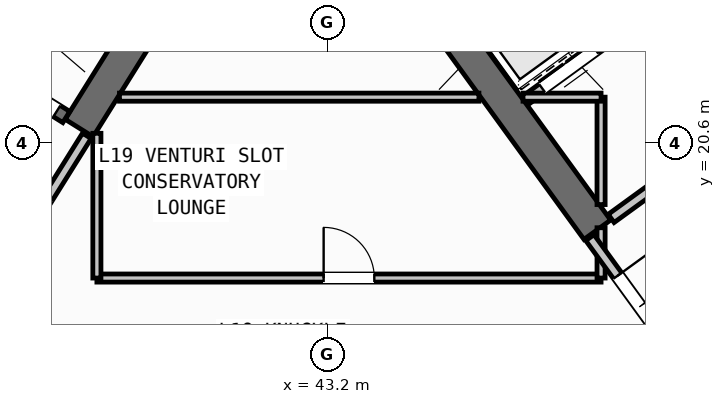
"""IFC4 building model, lengths in metres.
Left out: names, types, materials, properties, quantities, classifications, styles, units other than length and angle.
Written with IfcOpenShell. Run it as: python <this file> out.ifc"""

import sys

from ifc_helpers import new_model, si_unit, direction, frame, frame_2d, origin, place, context, subcontext, project, spatial, rectangle, extrude, source, transform, mapped, element, fill, save


model = new_model("IFC4")
c1 = context("Model", 3, precision=1e-05, world=origin(), true_north=direction((0.0, 1.0)))
c2 = subcontext(c1, "Body", "Model", "MODEL_VIEW")
j1 = project(units=[si_unit("LENGTHUNIT", "METRE"), si_unit("PLANEANGLEUNIT", "RADIAN")], contexts=[c1])
p1 = place(None, origin())
s1 = spatial("IfcSite", under=j1, at=p1, CompositionType="ELEMENT")
p2 = place(p1, origin())
s2 = spatial("IfcBuilding", under=s1, at=p2, CompositionType="ELEMENT")
p3 = place(p2, frame((0.0, 0.0, 76.5)))
s3 = spatial("IfcBuildingStorey", under=s2, at=p3, CompositionType="ELEMENT", Elevation=76.5)
p4 = place(p3, frame((40.168, 23.88, 0.0), z_axis=(0.0, 0.0, 1.0), x_axis=(-0.529893103397, -0.8480644427, 0.0)))
e1 = element("IfcWall", 1, at=p4, inside=s3, PredefinedType="SHEAR", context=c2, shape_type="SweptSolid", body=[
    extrude(rectangle(XDim=3.525, YDim=0.65, at=frame_2d((1.763, 0.0))), origin(), (0.0, 0.0, 1.0), 4.25),
])
p5 = place(p3, frame((48.526, 18.884, 0.0), z_axis=(0.0, 0.0, 1.0), x_axis=(-0.58777996584, 0.809020835181, 0.0)))
e2 = element("IfcWall", 2, at=p5, inside=s3, PredefinedType="SHEAR", context=c2, shape_type="SweptSolid", body=[
    extrude(rectangle(XDim=6.375, YDim=0.65, at=frame_2d((3.188, 0.0))), origin(), (0.0, 0.0, 1.0), 4.25),
])
p6 = place(p3, frame((38.046, 21.108, 0.0), z_axis=(0.0, 0.0, 1.0), x_axis=(-0.848054434086, 0.529909121291, 0.0)))
e3 = element("IfcWall", 3, at=p6, inside=s3, PredefinedType="SHEAR", context=c2, shape_type="SweptSolid", body=[
    extrude(rectangle(XDim=7.33, YDim=0.26, at=frame_2d((3.665, 0.0))), origin(), (0.0, 0.0, 1.0), 4.25),
])
p7 = place(p6, frame((0.22, 0.0, 0.0)))
e4 = element("IfcOpeningElement", 4, at=p7, cuts=e3, PredefinedType="OPENING", context=c2, shape_type="SweptSolid", body=[
    extrude(rectangle(XDim=1.1, YDim=2.1, at=frame_2d((0.55, 1.05))), frame((0.0, 0.14, 0.0), z_axis=(0.0, -1.0, 0.0), x_axis=(1.0, 0.0, 0.0)), (0.0, 0.0, 1.0), 0.28),
])
p8 = place(p3, frame((47.106, 21.437, 0.0), z_axis=(0.0, 0.0, 1.0), x_axis=(0.809012514015, 0.58779141893, 0.0)))
e5 = element("IfcWall", 5, at=p8, inside=s3, PredefinedType="STANDARD", context=c2, shape_type="SweptSolid", body=[
    extrude(rectangle(XDim=3.398, YDim=0.2, at=frame_2d((1.699, 0.0))), origin(), (0.0, 0.0, 1.0), 4.24),
])
p9 = place(p8, frame((0.408, 0.0, 0.0)))
e6 = element("IfcOpeningElement", 6, at=p9, cuts=e5, PredefinedType="OPENING", context=c2, shape_type="SweptSolid", body=[
    extrude(rectangle(XDim=1.3, YDim=2.2, at=frame_2d((0.65, 1.1))), frame((0.0, 0.11, 0.0), z_axis=(0.0, -1.0, 0.0), x_axis=(1.0, 0.0, 0.0)), (0.0, 0.0, 1.0), 0.22),
])
p10 = place(p3, frame((48.799, 19.107, 0.0), z_axis=(0.0, 0.0, 1.0), x_axis=(0.809012959416, 0.587790805897, 0.0)))
e7 = element("IfcWall", 7, at=p10, inside=s3, PredefinedType="STANDARD", context=c2, shape_type="SweptSolid", body=[
    extrude(rectangle(XDim=5.718, YDim=0.2, at=frame_2d((2.859, 0.0))), origin(), (0.0, 0.0, 1.0), 4.24),
])
p11 = place(p10, frame((2.498, 0.0, 0.0)))
e8 = element("IfcOpeningElement", 8, at=p11, cuts=e7, PredefinedType="OPENING", context=c2, shape_type="SweptSolid", body=[
    extrude(rectangle(XDim=1.15, YDim=2.1, at=frame_2d((0.575, 1.05))), frame((0.0, 0.11, 0.0), z_axis=(0.0, -1.0, 0.0), x_axis=(1.0, 0.0, 0.0)), (0.0, 0.0, 1.0), 0.22),
])
p12 = place(p3, frame((38.451, 20.737, 0.0), z_axis=(0.0, 0.0, 1.0), x_axis=(-0.529924799939, -0.848044637038, 0.0)))
e9 = element("IfcWall", 9, at=p12, inside=s3, PredefinedType="STANDARD", context=c2, shape_type="SweptSolid", body=[
    extrude(rectangle(XDim=2.96, YDim=0.2, at=frame_2d((1.48, 0.0))), origin(), (0.0, 0.0, 1.0), 4.24),
])
p13 = place(p12, frame((1.46, 0.0, 0.0)))
e10 = element("IfcOpeningElement", 10, at=p13, cuts=e9, PredefinedType="OPENING", context=c2, shape_type="SweptSolid", body=[
    extrude(rectangle(XDim=0.86, YDim=2.05, at=frame_2d((0.43, 1.025))), frame((0.0, 0.11, 0.0), z_axis=(0.0, -1.0, 0.0), x_axis=(1.0, 0.0, 0.0)), (0.0, 0.0, 1.0), 0.22),
])
p14 = place(p3, frame((38.65, 17.93, 0.0), z_axis=(0.0, 0.0, 1.0), x_axis=(1.0, 0.0, 0.0)))
e11 = element("IfcWall", 11, at=p14, inside=s3, PredefinedType="PARTITIONING", context=c2, shape_type="SweptSolid", body=[
    extrude(rectangle(XDim=9.95, YDim=0.16, at=frame_2d((4.975, 0.0))), origin(), (0.0, 0.0, 1.0), 4.24),
])
p15 = place(p14, frame((4.475, 0.0, 0.0)))
e12 = element("IfcOpeningElement", 12, at=p15, cuts=e11, PredefinedType="OPENING", context=c2, shape_type="SweptSolid", body=[
    extrude(rectangle(XDim=1.0, YDim=2.1, at=frame_2d((0.5, 1.05))), frame((0.0, 0.09, 0.0), z_axis=(0.0, -1.0, 0.0), x_axis=(1.0, 0.0, 0.0)), (0.0, 0.0, 1.0), 0.18),
])
p16 = place(p3, frame((38.65, 17.93, 0.0), z_axis=(0.0, 0.0, 1.0), x_axis=(0.0, 1.0, 0.0)))
e13 = element("IfcWall", 13, at=p16, inside=s3, PredefinedType="PARTITIONING", context=c2, shape_type="SweptSolid", body=[
    extrude(rectangle(XDim=2.857, YDim=0.16, at=frame_2d((1.428, 0.0))), origin(), (0.0, 0.0, 1.0), 4.24),
])
p17 = place(p3, frame((48.6, 17.93, 0.0), z_axis=(0.0, 0.0, 1.0), x_axis=(0.0, 1.0, 0.0)))
e14 = element("IfcWall", 14, at=p17, inside=s3, PredefinedType="PARTITIONING", context=c2, shape_type="SweptSolid", body=[
    extrude(rectangle(XDim=0.993, YDim=0.16, at=frame_2d((0.496, 0.0))), origin(), (0.0, 0.0, 1.0), 4.24),
])
p18 = place(p3, frame((48.6, 19.38, 0.0), z_axis=(0.0, 0.0, 1.0), x_axis=(0.0, 1.0, 0.0)))
e15 = element("IfcWall", 15, at=p18, inside=s3, PredefinedType="PARTITIONING", context=c2, shape_type="SweptSolid", body=[
    extrude(rectangle(XDim=2.12, YDim=0.16, at=frame_2d((1.06, 0.0))), origin(), (0.0, 0.0, 1.0), 4.24),
])
p19 = place(p3, frame((39.095, 21.5, 0.0), z_axis=(0.0, 0.0, 1.0), x_axis=(1.0, 0.0, 0.0)))
e16 = element("IfcWall", 16, at=p19, inside=s3, PredefinedType="PARTITIONING", context=c2, shape_type="SweptSolid", body=[
    extrude(rectangle(XDim=7.094, YDim=0.16, at=frame_2d((3.547, 0.0))), origin(), (0.0, 0.0, 1.0), 4.24),
])
p20 = place(p3, frame((47.06, 21.5, 0.0), z_axis=(0.0, 0.0, 1.0), x_axis=(1.0, 0.0, 0.0)))
e17 = element("IfcWall", 17, at=p20, inside=s3, PredefinedType="PARTITIONING", context=c2, shape_type="SweptSolid", body=[
    extrude(rectangle(XDim=1.54, YDim=0.16, at=frame_2d((0.77, 0.0))), origin(), (0.0, 0.0, 1.0), 4.24),
])
p21 = place(p3, frame((50.119, 16.333, 0.0), z_axis=(0.0, 0.0, 1.0), x_axis=(-0.587749856981, 0.809042709391, 0.0)))
e18 = element("IfcWall", 18, at=p21, inside=s3, PredefinedType="STANDARD", context=c2, shape_type="SweptSolid", body=[
    extrude(rectangle(XDim=2.96, YDim=0.2, at=frame_2d((1.48, 0.0))), origin(), (0.0, 0.0, 1.0), 4.24),
])
p22 = place(p21, frame((0.53, 0.0, 0.0)))
e19 = element("IfcOpeningElement", 19, at=p22, cuts=e18, PredefinedType="OPENING", context=c2, shape_type="SweptSolid", body=[
    extrude(rectangle(XDim=1.5, YDim=2.15, at=frame_2d((0.75, 1.075))), frame((0.0, 0.11, 0.0), z_axis=(0.0, -1.0, 0.0), x_axis=(1.0, 0.0, 0.0)), (0.0, 0.0, 1.0), 0.22),
])
m1 = source(origin(), c2, "Body", "SweptSolid", [
    extrude(rectangle(XDim=1.1, YDim=2.1, at=frame_2d((0.55, 1.05))), frame((0.0, 0.025, 0.0), z_axis=(0.0, -1.0, 0.0), x_axis=(1.0, 0.0, 0.0)), (0.0, 0.0, 1.0), 0.05),
])
p23 = place(p7, origin())
e20 = element("IfcDoor", 20, at=p23, inside=s3, OperationType="SINGLE_SWING_RIGHT", PredefinedType="DOOR", context=c2, shape_type="MappedRepresentation", body=[
    mapped(m1, transform((0.0, 0.0, 0.0), scale=1.0)),
])
fill(e4, e20)
m2 = source(origin(), c2, "Body", "SweptSolid", [
    extrude(rectangle(XDim=1.3, YDim=2.2, at=frame_2d((0.65, 1.1))), frame((0.0, 0.025, 0.0), z_axis=(0.0, -1.0, 0.0), x_axis=(1.0, 0.0, 0.0)), (0.0, 0.0, 1.0), 0.05),
])
p24 = place(p9, origin())
e21 = element("IfcDoor", 21, at=p24, inside=s3, OperationType="DOUBLE_DOOR_SLIDING", PredefinedType="DOOR", context=c2, shape_type="MappedRepresentation", body=[
    mapped(m2, transform((0.0, 0.0, 0.0), scale=1.0)),
])
fill(e6, e21)
m3 = source(origin(), c2, "Body", "SweptSolid", [
    extrude(rectangle(XDim=1.0, YDim=2.1, at=frame_2d((0.5, 1.05))), frame((0.0, 0.025, 0.0), z_axis=(0.0, -1.0, 0.0), x_axis=(1.0, 0.0, 0.0)), (0.0, 0.0, 1.0), 0.05),
])
p25 = place(p15, origin())
e22 = element("IfcDoor", 22, at=p25, inside=s3, OperationType="SINGLE_SWING_LEFT", PredefinedType="DOOR", context=c2, shape_type="MappedRepresentation", body=[
    mapped(m3, transform((0.0, 0.0, 0.0), scale=1.0)),
])
fill(e12, e22)
m4 = source(origin(), c2, "Body", "SweptSolid", [
    extrude(rectangle(XDim=1.5, YDim=2.15, at=frame_2d((0.75, 1.075))), frame((0.0, 0.025, 0.0), z_axis=(0.0, -1.0, 0.0), x_axis=(1.0, 0.0, 0.0)), (0.0, 0.0, 1.0), 0.05),
])
p26 = place(p22, frame((1.5, 0.0, 0.0), z_axis=(0.0, 0.0, 1.0), x_axis=(-1.0, 0.0, 0.0)))
e23 = element("IfcDoor", 23, at=p26, inside=s3, OperationType="DOUBLE_DOOR_SINGLE_SWING", PredefinedType="DOOR", context=c2, shape_type="MappedRepresentation", body=[
    mapped(m4, transform((0.0, 0.0, 0.0), scale=1.0)),
])
fill(e19, e23)
save(model, sys.argv[1])
